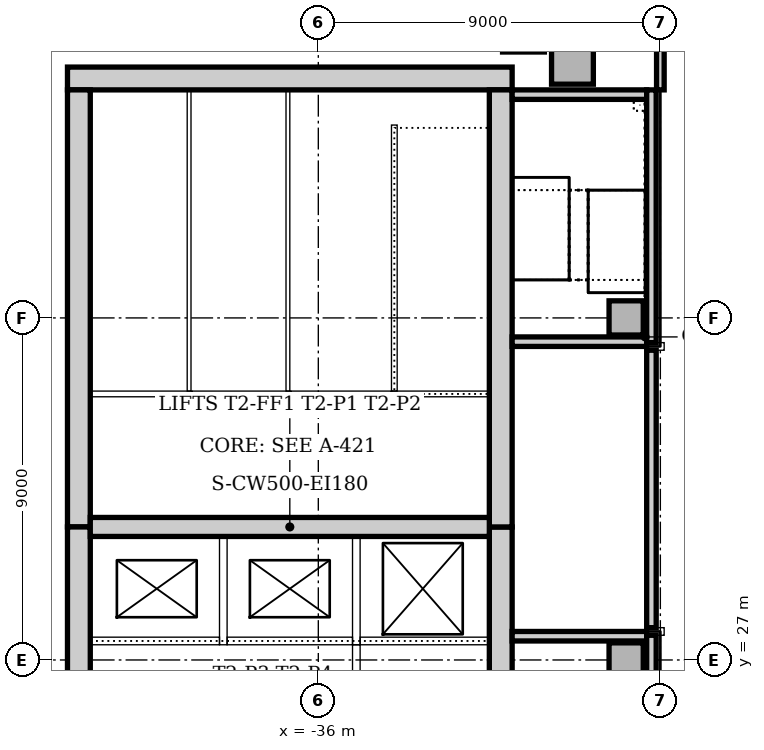
"""IFC4 building model, lengths in metres.
Left out: names, types, materials, properties, quantities, classifications, styles, units other than length and angle.
Written with IfcOpenShell. Run it as: python <this file> out.ifc"""

import sys

from ifc_helpers import new_model, si_unit, direction, frame, frame_2d, origin, origin_2d, place, context, subcontext, project, spatial, rectangle, extrude, element, fill, save


model = new_model("IFC4")
c1 = context("Model", 3, precision=1e-05, world=origin(), true_north=direction((0.0, 1.0)))
c2 = subcontext(c1, "Body", "Model", "MODEL_VIEW")
j1 = project(units=[si_unit("LENGTHUNIT", "METRE"), si_unit("PLANEANGLEUNIT", "RADIAN")], contexts=[c1])
p1 = place(None, origin())
s1 = spatial("IfcSite", under=j1, at=p1, CompositionType="ELEMENT")
p2 = place(p1, origin())
s2 = spatial("IfcBuilding", under=s1, at=p2, CompositionType="ELEMENT")
p3 = place(p2, frame((0.0, 0.0, 11.0)))
s3 = spatial("IfcBuildingStorey", under=s2, at=p3, CompositionType="ELEMENT", Elevation=11.0)
p4 = place(p3, frame((-30.9, 42.3, 0.0), z_axis=(0.0, 0.0, 1.0), x_axis=(-1.0, 0.0, 0.0)))
e1 = element("IfcWall", 1, at=p4, inside=s3, PredefinedType="SOLIDWALL", context=c2, shape_type="SweptSolid", body=[
    extrude(rectangle(XDim=11.7, YDim=0.6, at=frame_2d((5.85, 0.0))), origin(), (0.0, 0.0, 1.0), 5.0),
])
p5 = place(p3, frame((-31.2, 21.0, 0.0), z_axis=(0.0, 0.0, 1.0), x_axis=(0.0, 1.0, 0.0)))
e2 = element("IfcWall", 2, at=p5, inside=s3, PredefinedType="SOLIDWALL", context=c2, shape_type="SweptSolid", body=[
    extrude(rectangle(XDim=9.5, YDim=0.6, at=frame_2d((4.75, 0.0))), origin(), (0.0, 0.0, 1.0), 5.0),
])
p6 = place(p5, frame((5.25, 0.0, 0.0)))
e3 = element("IfcOpeningElement", 3, at=p6, cuts=e2, PredefinedType="OPENING", context=c2, shape_type="SweptSolid", body=[
    extrude(rectangle(XDim=1.0, YDim=2.1, at=frame_2d((0.5, 1.05))), frame((0.0, 0.31, 0.0), z_axis=(0.0, -1.0, 0.0), x_axis=(1.0, 0.0, 0.0)), (0.0, 0.0, 1.0), 0.62),
])
p7 = place(p3, frame((-31.2, 30.5, 0.0), z_axis=(0.0, 0.0, 1.0), x_axis=(0.0, 1.0, 0.0)))
e4 = element("IfcWall", 4, at=p7, inside=s3, PredefinedType="SOLIDWALL", context=c2, shape_type="SweptSolid", body=[
    extrude(rectangle(XDim=11.5, YDim=0.6, at=frame_2d((5.75, 0.0))), origin(), (0.0, 0.0, 1.0), 5.0),
])
p8 = place(p7, frame((0.85, 0.0, 0.0)))
e5 = element("IfcOpeningElement", 5, at=p8, cuts=e4, PredefinedType="OPENING", context=c2, shape_type="SweptSolid", body=[
    extrude(rectangle(XDim=1.8, YDim=2.1, at=frame_2d((0.9, 1.05))), frame((0.0, 0.31, 0.0), z_axis=(0.0, -1.0, 0.0), x_axis=(1.0, 0.0, 0.0)), (0.0, 0.0, 1.0), 0.62),
])
p9 = place(p3, frame((-42.3, 42.0, 0.0), z_axis=(0.0, 0.0, 1.0), x_axis=(0.0, -1.0, 0.0)))
e6 = element("IfcWall", 6, at=p9, inside=s3, PredefinedType="SOLIDWALL", context=c2, shape_type="SweptSolid", body=[
    extrude(rectangle(XDim=11.5, YDim=0.6, at=frame_2d((5.75, 0.0))), origin(), (0.0, 0.0, 1.0), 5.0),
])
p10 = place(p9, frame((8.85, 0.0, 0.0)))
e7 = element("IfcOpeningElement", 7, at=p10, cuts=e6, PredefinedType="OPENING", context=c2, shape_type="SweptSolid", body=[
    extrude(rectangle(XDim=1.8, YDim=2.1, at=frame_2d((0.9, 1.05))), frame((0.0, 0.31, 0.0), z_axis=(0.0, -1.0, 0.0), x_axis=(1.0, 0.0, 0.0)), (0.0, 0.0, 1.0), 0.62),
])
p11 = place(p3, frame((-42.3, 30.5, 0.0), z_axis=(0.0, 0.0, 1.0), x_axis=(0.0, -1.0, 0.0)))
e8 = element("IfcWall", 8, at=p11, inside=s3, PredefinedType="SOLIDWALL", context=c2, shape_type="SweptSolid", body=[
    extrude(rectangle(XDim=9.5, YDim=0.6, at=frame_2d((4.75, 0.0))), origin(), (0.0, 0.0, 1.0), 5.0),
])
p12 = place(p11, frame((3.85, 0.0, 0.0)))
e9 = element("IfcOpeningElement", 9, at=p12, cuts=e8, PredefinedType="OPENING", context=c2, shape_type="SweptSolid", body=[
    extrude(rectangle(XDim=1.8, YDim=2.1, at=frame_2d((0.9, 1.05))), frame((0.0, 0.31, 0.0), z_axis=(0.0, -1.0, 0.0), x_axis=(1.0, 0.0, 0.0)), (0.0, 0.0, 1.0), 0.62),
])
p13 = place(p3, frame((-42.0, 30.5, 0.0), z_axis=(0.0, 0.0, 1.0), x_axis=(1.0, 0.0, 0.0)))
e10 = element("IfcWall", 10, at=p13, inside=s3, PredefinedType="SOLIDWALL", context=c2, shape_type="SweptSolid", body=[
    extrude(rectangle(XDim=10.5, YDim=0.5, at=frame_2d((5.25, 0.0))), origin(), (0.0, 0.0, 1.0), 5.0),
])
p14 = place(p3, frame((-27.36, 27.625, 0.0), z_axis=(0.0, 0.0, 1.0), x_axis=(-1.0, 0.0, 0.0)))
e11 = element("IfcWall", 11, at=p14, inside=s3, PredefinedType="SOLIDWALL", context=c2, shape_type="SweptSolid", body=[
    extrude(rectangle(XDim=3.54, YDim=0.25, at=frame_2d((1.77, 0.0))), origin(), (0.0, 0.0, 1.0), 5.0),
])
p15 = place(p14, frame((1.69, 0.0, 0.0)))
e12 = element("IfcOpeningElement", 12, at=p15, cuts=e11, PredefinedType="OPENING", context=c2, shape_type="SweptSolid", body=[
    extrude(rectangle(XDim=1.1, YDim=2.1, at=frame_2d((0.55, 1.05))), frame((0.0, 0.135, 0.0), z_axis=(0.0, -1.0, 0.0), x_axis=(1.0, 0.0, 0.0)), (0.0, 0.0, 1.0), 0.27),
])
p16 = place(p3, frame((-30.9, 35.375, 0.0), z_axis=(0.0, 0.0, 1.0), x_axis=(1.0, 0.0, 0.0)))
e13 = element("IfcWall", 13, at=p16, inside=s3, PredefinedType="SOLIDWALL", context=c2, shape_type="SweptSolid", body=[
    extrude(rectangle(XDim=3.54, YDim=0.25, at=frame_2d((1.77, 0.0))), origin(), (0.0, 0.0, 1.0), 5.0),
])
p17 = place(p16, frame((0.75, 0.0, 0.0)))
e14 = element("IfcOpeningElement", 14, at=p17, cuts=e13, PredefinedType="OPENING", context=c2, shape_type="SweptSolid", body=[
    extrude(rectangle(XDim=1.1, YDim=2.1, at=frame_2d((0.55, 1.05))), frame((0.0, 0.135, 0.0), z_axis=(0.0, -1.0, 0.0), x_axis=(1.0, 0.0, 0.0)), (0.0, 0.0, 1.0), 0.27),
])
p18 = place(p3, frame((-27.36, 41.875, 0.0), z_axis=(0.0, 0.0, 1.0), x_axis=(-1.0, 0.0, 0.0)))
e15 = element("IfcWall", 15, at=p18, inside=s3, PredefinedType="SOLIDWALL", context=c2, shape_type="SweptSolid", body=[
    extrude(rectangle(XDim=3.54, YDim=0.25, at=frame_2d((1.77, 0.0))), origin(), (0.0, 0.0, 1.0), 5.0),
])
p19 = place(p3, frame((-27.235, 21.0, 0.0), z_axis=(0.0, 0.0, 1.0), x_axis=(0.0, 1.0, 0.0)))
e16 = element("IfcWall", 16, at=p19, inside=s3, PredefinedType="SOLIDWALL", context=c2, shape_type="SweptSolid", body=[
    extrude(rectangle(XDim=6.65, YDim=0.25, at=frame_2d((3.325, 0.0))), origin(), (0.0, 0.0, 1.0), 5.0),
])
p20 = place(p3, frame((-27.235, 27.85, 0.0), z_axis=(0.0, 0.0, 1.0), x_axis=(0.0, 1.0, 0.0)))
e17 = element("IfcWall", 17, at=p20, inside=s3, PredefinedType="SOLIDWALL", context=c2, shape_type="SweptSolid", body=[
    extrude(rectangle(XDim=7.3, YDim=0.25, at=frame_2d((3.65, 0.0))), origin(), (0.0, 0.0, 1.0), 5.0),
])
p21 = place(p3, frame((-27.235, 35.35, 0.0), z_axis=(0.0, 0.0, 1.0), x_axis=(0.0, 1.0, 0.0)))
e18 = element("IfcWall", 18, at=p21, inside=s3, PredefinedType="SOLIDWALL", context=c2, shape_type="SweptSolid", body=[
    extrude(rectangle(XDim=6.65, YDim=0.25, at=frame_2d((3.325, 0.0))), origin(), (0.0, 0.0, 1.0), 5.0),
])
for number, where, z_axis, x_axis in (
    (19, (-29.313, 42.7, 0.0), (0.0, 0.0, 1.0), (1.0, 0.0, 0.0)),
    (20, (-30.602, 43.547, 0.0), (0.0, 0.0, 1.0), (1.0, 0.0, 0.0)),
):
    element("IfcColumn", number, at=place(p3, frame(where, z_axis=z_axis, x_axis=x_axis)), inside=s3, PredefinedType="COLUMN", context=c2, shape_type="SweptSolid", body=[
        extrude(rectangle(XDim=1.1, YDim=1.1, at=origin_2d()), origin(), (0.0, 0.0, 1.0), 4.7),
    ])
for number, where, z_axis, x_axis in (
    (21, (-27.9, 27.0, 0.0), (0.0, 0.0, 1.0), (1.0, 0.0, 0.0)),
    (22, (-27.9, 36.0, 0.0), (0.0, 0.0, 1.0), (1.0, 0.0, 0.0)),
):
    element("IfcColumn", number, at=place(p3, frame(where, z_axis=z_axis, x_axis=x_axis)), inside=s3, PredefinedType="COLUMN", context=c2, shape_type="SweptSolid", body=[
        extrude(rectangle(XDim=0.9, YDim=0.9, at=origin_2d()), origin(), (0.0, 0.0, 1.0), 5.0),
    ])
p22 = place(p3, frame((-27.0, 42.0, 0.0), z_axis=(0.0, 0.0, 1.0), x_axis=(0.0, 1.0, 0.0)))
e23 = element("IfcWall", 23, at=p22, inside=s3, PredefinedType="PARTITIONING", context=c2, shape_type="SweptSolid", body=[
    extrude(rectangle(XDim=3.0, YDim=0.2, at=frame_2d((1.5, 0.0))), origin(), (0.0, 0.0, 1.0), 4.7),
])
p23 = place(p3, frame((-38.5, 27.4, 0.0), z_axis=(0.0, 0.0, 1.0), x_axis=(0.0, 1.0, 0.0)))
e24 = element("IfcWall", 24, at=p23, inside=s3, PredefinedType="SOLIDWALL", context=c2, shape_type="SweptSolid", body=[
    extrude(rectangle(XDim=2.85, YDim=0.2, at=frame_2d((1.425, 0.0))), origin(), (0.0, 0.0, 1.0), 5.0),
])
p24 = place(p3, frame((-42.0, 27.5, 0.0), z_axis=(0.0, 0.0, 1.0), x_axis=(1.0, 0.0, 0.0)))
e25 = element("IfcWall", 25, at=p24, inside=s3, PredefinedType="SOLIDWALL", context=c2, shape_type="SweptSolid", body=[
    extrude(rectangle(XDim=3.4, YDim=0.2, at=frame_2d((1.7, 0.0))), origin(), (0.0, 0.0, 1.0), 5.0),
])
p25 = place(p24, frame((1.5, 0.0, 0.0)))
e26 = element("IfcOpeningElement", 26, at=p25, cuts=e25, PredefinedType="OPENING", context=c2, shape_type="SweptSolid", body=[
    extrude(rectangle(XDim=1.1, YDim=2.1, at=frame_2d((0.55, 1.05))), frame((0.0, 0.11, 0.0), z_axis=(0.0, -1.0, 0.0), x_axis=(1.0, 0.0, 0.0)), (0.0, 0.0, 1.0), 0.22),
])
p26 = place(p3, frame((-35.0, 27.4, 0.0), z_axis=(0.0, 0.0, 1.0), x_axis=(0.0, 1.0, 0.0)))
e27 = element("IfcWall", 27, at=p26, inside=s3, PredefinedType="SOLIDWALL", context=c2, shape_type="SweptSolid", body=[
    extrude(rectangle(XDim=2.85, YDim=0.2, at=frame_2d((1.425, 0.0))), origin(), (0.0, 0.0, 1.0), 5.0),
])
p27 = place(p3, frame((-38.4, 27.5, 0.0), z_axis=(0.0, 0.0, 1.0), x_axis=(1.0, 0.0, 0.0)))
e28 = element("IfcWall", 28, at=p27, inside=s3, PredefinedType="SOLIDWALL", context=c2, shape_type="SweptSolid", body=[
    extrude(rectangle(XDim=3.3, YDim=0.2, at=frame_2d((1.65, 0.0))), origin(), (0.0, 0.0, 1.0), 5.0),
])
p28 = place(p27, frame((1.1, 0.0, 0.0)))
e29 = element("IfcOpeningElement", 29, at=p28, cuts=e28, PredefinedType="OPENING", context=c2, shape_type="SweptSolid", body=[
    extrude(rectangle(XDim=1.1, YDim=2.1, at=frame_2d((0.55, 1.05))), frame((0.0, 0.11, 0.0), z_axis=(0.0, -1.0, 0.0), x_axis=(1.0, 0.0, 0.0)), (0.0, 0.0, 1.0), 0.22),
])
p29 = place(p3, frame((-34.9, 27.5, 0.0), z_axis=(0.0, 0.0, 1.0), x_axis=(1.0, 0.0, 0.0)))
e30 = element("IfcWall", 30, at=p29, inside=s3, PredefinedType="SOLIDWALL", context=c2, shape_type="SweptSolid", body=[
    extrude(rectangle(XDim=3.4, YDim=0.2, at=frame_2d((1.7, 0.0))), origin(), (0.0, 0.0, 1.0), 5.0),
])
p30 = place(p29, frame((1.1, 0.0, 0.0)))
e31 = element("IfcOpeningElement", 31, at=p30, cuts=e30, PredefinedType="OPENING", context=c2, shape_type="SweptSolid", body=[
    extrude(rectangle(XDim=1.1, YDim=2.1, at=frame_2d((0.55, 1.05))), frame((0.0, 0.11, 0.0), z_axis=(0.0, -1.0, 0.0), x_axis=(1.0, 0.0, 0.0)), (0.0, 0.0, 1.0), 0.22),
])
p31 = place(p3, frame((-35.0, 24.1, 0.0), z_axis=(0.0, 0.0, 1.0), x_axis=(0.0, 1.0, 0.0)))
e32 = element("IfcWall", 32, at=p31, inside=s3, PredefinedType="SOLIDWALL", context=c2, shape_type="SweptSolid", body=[
    extrude(rectangle(XDim=3.3, YDim=0.2, at=frame_2d((1.65, 0.0))), origin(), (0.0, 0.0, 1.0), 5.0),
])
p32 = place(p31, frame((1.15, 0.0, 0.0)))
e33 = element("IfcOpeningElement", 33, at=p32, cuts=e32, PredefinedType="OPENING", context=c2, shape_type="SweptSolid", body=[
    extrude(rectangle(XDim=1.0, YDim=2.1, at=frame_2d((0.5, 1.05))), frame((0.0, 0.11, 0.0), z_axis=(0.0, -1.0, 0.0), x_axis=(1.0, 0.0, 0.0)), (0.0, 0.0, 1.0), 0.22),
])
for number, where, z_axis, x_axis in (
    (34, (-27.36, 27.75, 0.0), (0.0, 0.0, 1.0), (1.0, 0.0, 0.0)),
    (35, (-26.9, 35.25, 0.0), (0.0, 0.0, 1.0), (-1.0, 0.0, 0.0)),
):
    element("IfcWall", number, at=place(p3, frame(where, z_axis=z_axis, x_axis=x_axis)), inside=s3, PredefinedType="SOLIDWALL", context=c2, shape_type="SweptSolid", body=[
        extrude(rectangle(XDim=0.46, YDim=0.2, at=frame_2d((0.23, 0.0))), origin(), (0.0, 0.0, 1.0), 5.0),
    ])
p33 = place(p3, frame((-34.075, 34.0, 0.0), z_axis=(0.0, 0.0, 1.0), x_axis=(1.0, 0.0, 0.0)))
e36 = element("IfcWall", 36, at=p33, inside=s3, PredefinedType="SOLIDWALL", context=c2, shape_type="SweptSolid", body=[
    extrude(rectangle(XDim=2.575, YDim=0.15, at=frame_2d((1.288, 0.0))), origin(), (0.0, 0.0, 1.0), 5.0),
])
p34 = place(p3, frame((-34.0, 41.075, 0.0), z_axis=(0.0, 0.0, 1.0), x_axis=(0.0, -1.0, 0.0)))
e37 = element("IfcWall", 37, at=p34, inside=s3, PredefinedType="SOLIDWALL", context=c2, shape_type="SweptSolid", body=[
    extrude(rectangle(XDim=7.0, YDim=0.15, at=frame_2d((3.5, 0.0))), origin(), (0.0, 0.0, 1.0), 5.0),
])
p35 = place(p3, frame((-39.325, 34.0, 0.0), z_axis=(0.0, 0.0, 1.0), x_axis=(-1.0, 0.0, 0.0)))
e38 = element("IfcWall", 38, at=p35, inside=s3, PredefinedType="PARTITIONING", context=c2, shape_type="SweptSolid", body=[
    extrude(rectangle(XDim=2.675, YDim=0.15, at=frame_2d((1.337, 0.0))), origin(), (0.0, 0.0, 1.0), 4.7),
])
p36 = place(p35, frame((0.975, 0.0, 0.0)))
e39 = element("IfcOpeningElement", 39, at=p36, cuts=e38, PredefinedType="OPENING", context=c2, shape_type="SweptSolid", body=[
    extrude(rectangle(XDim=0.8, YDim=2.1, at=frame_2d((0.4, 1.05))), frame((0.0, 0.085, 0.0), z_axis=(0.0, -1.0, 0.0), x_axis=(1.0, 0.0, 0.0)), (0.0, 0.0, 1.0), 0.17),
])
p37 = place(p3, frame((-36.725, 34.0, 0.0), z_axis=(0.0, 0.0, 1.0), x_axis=(-1.0, 0.0, 0.0)))
e40 = element("IfcWall", 40, at=p37, inside=s3, PredefinedType="PARTITIONING", context=c2, shape_type="SweptSolid", body=[
    extrude(rectangle(XDim=2.6, YDim=0.15, at=frame_2d((1.3, 0.0))), origin(), (0.0, 0.0, 1.0), 4.7),
])
p38 = place(p37, frame((0.975, 0.0, 0.0)))
e41 = element("IfcOpeningElement", 41, at=p38, cuts=e40, PredefinedType="OPENING", context=c2, shape_type="SweptSolid", body=[
    extrude(rectangle(XDim=0.8, YDim=2.1, at=frame_2d((0.4, 1.05))), frame((0.0, 0.085, 0.0), z_axis=(0.0, -1.0, 0.0), x_axis=(1.0, 0.0, 0.0)), (0.0, 0.0, 1.0), 0.17),
])
p39 = place(p3, frame((-34.075, 34.0, 0.0), z_axis=(0.0, 0.0, 1.0), x_axis=(-1.0, 0.0, 0.0)))
e42 = element("IfcWall", 42, at=p39, inside=s3, PredefinedType="PARTITIONING", context=c2, shape_type="SweptSolid", body=[
    extrude(rectangle(XDim=2.65, YDim=0.15, at=frame_2d((1.325, 0.0))), origin(), (0.0, 0.0, 1.0), 4.7),
])
p40 = place(p39, frame((0.925, 0.0, 0.0)))
e43 = element("IfcOpeningElement", 43, at=p40, cuts=e42, PredefinedType="OPENING", context=c2, shape_type="SweptSolid", body=[
    extrude(rectangle(XDim=0.8, YDim=2.1, at=frame_2d((0.4, 1.05))), frame((0.0, 0.085, 0.0), z_axis=(0.0, -1.0, 0.0), x_axis=(1.0, 0.0, 0.0)), (0.0, 0.0, 1.0), 0.17),
])
for number, where, z_axis, x_axis in (
    (44, (-39.4, 34.075, 0.0), (0.0, 0.0, 1.0), (0.0, 1.0, 0.0)),
    (45, (-36.8, 34.075, 0.0), (0.0, 0.0, 1.0), (0.0, 1.0, 0.0)),
):
    element("IfcWall", number, at=place(p3, frame(where, z_axis=z_axis, x_axis=x_axis)), inside=s3, PredefinedType="PARTITIONING", context=c2, shape_type="SweptSolid", body=[
        extrude(rectangle(XDim=7.925, YDim=0.1, at=frame_2d((3.962, 0.0))), origin(), (0.0, 0.0, 1.0), 4.7),
    ])
p41 = place(p25, origin())
e46 = element("IfcDoor", 46, at=p41, inside=s3, OperationType="SLIDING_TO_LEFT", PredefinedType="DOOR", context=c2, shape_type="SweptSolid", body=[
    extrude(rectangle(XDim=1.1, YDim=2.1, at=frame_2d((0.55, 1.05))), frame((0.0, 0.025, 0.0), z_axis=(0.0, -1.0, 0.0), x_axis=(1.0, 0.0, 0.0)), (0.0, 0.0, 1.0), 0.05),
])
fill(e26, e46)
p42 = place(p28, origin())
e47 = element("IfcDoor", 47, at=p42, inside=s3, OperationType="SLIDING_TO_LEFT", PredefinedType="DOOR", context=c2, shape_type="SweptSolid", body=[
    extrude(rectangle(XDim=1.1, YDim=2.1, at=frame_2d((0.55, 1.05))), frame((0.0, 0.025, 0.0), z_axis=(0.0, -1.0, 0.0), x_axis=(1.0, 0.0, 0.0)), (0.0, 0.0, 1.0), 0.05),
])
fill(e29, e47)
p43 = place(p30, origin())
e48 = element("IfcDoor", 48, at=p43, inside=s3, OperationType="SLIDING_TO_LEFT", PredefinedType="DOOR", context=c2, shape_type="SweptSolid", body=[
    extrude(rectangle(XDim=1.1, YDim=2.1, at=frame_2d((0.55, 1.05))), frame((0.0, 0.025, 0.0), z_axis=(0.0, -1.0, 0.0), x_axis=(1.0, 0.0, 0.0)), (0.0, 0.0, 1.0), 0.05),
])
fill(e31, e48)
p44 = place(p6, frame((1.0, 0.0, 0.0), z_axis=(0.0, 0.0, 1.0), x_axis=(-1.0, 0.0, 0.0)))
e49 = element("IfcDoor", 49, at=p44, inside=s3, OperationType="SINGLE_SWING_LEFT", PredefinedType="DOOR", context=c2, shape_type="SweptSolid", body=[
    extrude(rectangle(XDim=1.0, YDim=2.1, at=frame_2d((0.5, 1.05))), frame((0.0, 0.025, 0.0), z_axis=(0.0, -1.0, 0.0), x_axis=(1.0, 0.0, 0.0)), (0.0, 0.0, 1.0), 0.05),
])
fill(e3, e49)
p45 = place(p15, origin())
e50 = element("IfcDoor", 50, at=p45, inside=s3, OperationType="SINGLE_SWING_RIGHT", PredefinedType="DOOR", context=c2, shape_type="SweptSolid", body=[
    extrude(rectangle(XDim=1.1, YDim=2.1, at=frame_2d((0.55, 1.05))), frame((0.0, 0.025, 0.0), z_axis=(0.0, -1.0, 0.0), x_axis=(1.0, 0.0, 0.0)), (0.0, 0.0, 1.0), 0.05),
])
fill(e12, e50)
p46 = place(p17, origin())
e51 = element("IfcDoor", 51, at=p46, inside=s3, OperationType="SINGLE_SWING_RIGHT", PredefinedType="DOOR", context=c2, shape_type="SweptSolid", body=[
    extrude(rectangle(XDim=1.1, YDim=2.1, at=frame_2d((0.55, 1.05))), frame((0.0, 0.025, 0.0), z_axis=(0.0, -1.0, 0.0), x_axis=(1.0, 0.0, 0.0)), (0.0, 0.0, 1.0), 0.05),
])
fill(e14, e51)
p47 = place(p8, origin())
e52 = element("IfcDoor", 52, at=p47, inside=s3, OperationType="DOUBLE_DOOR_SINGLE_SWING", PredefinedType="DOOR", context=c2, shape_type="SweptSolid", body=[
    extrude(rectangle(XDim=1.8, YDim=2.1, at=frame_2d((0.9, 1.05))), frame((0.0, 0.025, 0.0), z_axis=(0.0, -1.0, 0.0), x_axis=(1.0, 0.0, 0.0)), (0.0, 0.0, 1.0), 0.05),
])
fill(e5, e52)
p48 = place(p10, frame((1.8, 0.0, 0.0), z_axis=(0.0, 0.0, 1.0), x_axis=(-1.0, 0.0, 0.0)))
e53 = element("IfcDoor", 53, at=p48, inside=s3, OperationType="DOUBLE_DOOR_SINGLE_SWING", PredefinedType="DOOR", context=c2, shape_type="SweptSolid", body=[
    extrude(rectangle(XDim=1.8, YDim=2.1, at=frame_2d((0.9, 1.05))), frame((0.0, 0.025, 0.0), z_axis=(0.0, -1.0, 0.0), x_axis=(1.0, 0.0, 0.0)), (0.0, 0.0, 1.0), 0.05),
])
fill(e7, e53)
p49 = place(p36, frame((0.8, 0.0, 0.0), z_axis=(0.0, 0.0, 1.0), x_axis=(-1.0, 0.0, 0.0)))
e54 = element("IfcDoor", 54, at=p49, inside=s3, OperationType="SINGLE_SWING_LEFT", PredefinedType="DOOR", context=c2, shape_type="SweptSolid", body=[
    extrude(rectangle(XDim=0.8, YDim=2.1, at=frame_2d((0.4, 1.05))), frame((0.0, 0.025, 0.0), z_axis=(0.0, -1.0, 0.0), x_axis=(1.0, 0.0, 0.0)), (0.0, 0.0, 1.0), 0.05),
])
fill(e39, e54)
p50 = place(p38, frame((0.8, 0.0, 0.0), z_axis=(0.0, 0.0, 1.0), x_axis=(-1.0, 0.0, 0.0)))
e55 = element("IfcDoor", 55, at=p50, inside=s3, OperationType="SINGLE_SWING_RIGHT", PredefinedType="DOOR", context=c2, shape_type="SweptSolid", body=[
    extrude(rectangle(XDim=0.8, YDim=2.1, at=frame_2d((0.4, 1.05))), frame((0.0, 0.025, 0.0), z_axis=(0.0, -1.0, 0.0), x_axis=(1.0, 0.0, 0.0)), (0.0, 0.0, 1.0), 0.05),
])
fill(e41, e55)
p51 = place(p40, frame((0.8, 0.0, 0.0), z_axis=(0.0, 0.0, 1.0), x_axis=(-1.0, 0.0, 0.0)))
e56 = element("IfcDoor", 56, at=p51, inside=s3, OperationType="SINGLE_SWING_LEFT", PredefinedType="DOOR", context=c2, shape_type="SweptSolid", body=[
    extrude(rectangle(XDim=0.8, YDim=2.1, at=frame_2d((0.4, 1.05))), frame((0.0, 0.025, 0.0), z_axis=(0.0, -1.0, 0.0), x_axis=(1.0, 0.0, 0.0)), (0.0, 0.0, 1.0), 0.05),
])
fill(e43, e56)
save(model, sys.argv[1])
